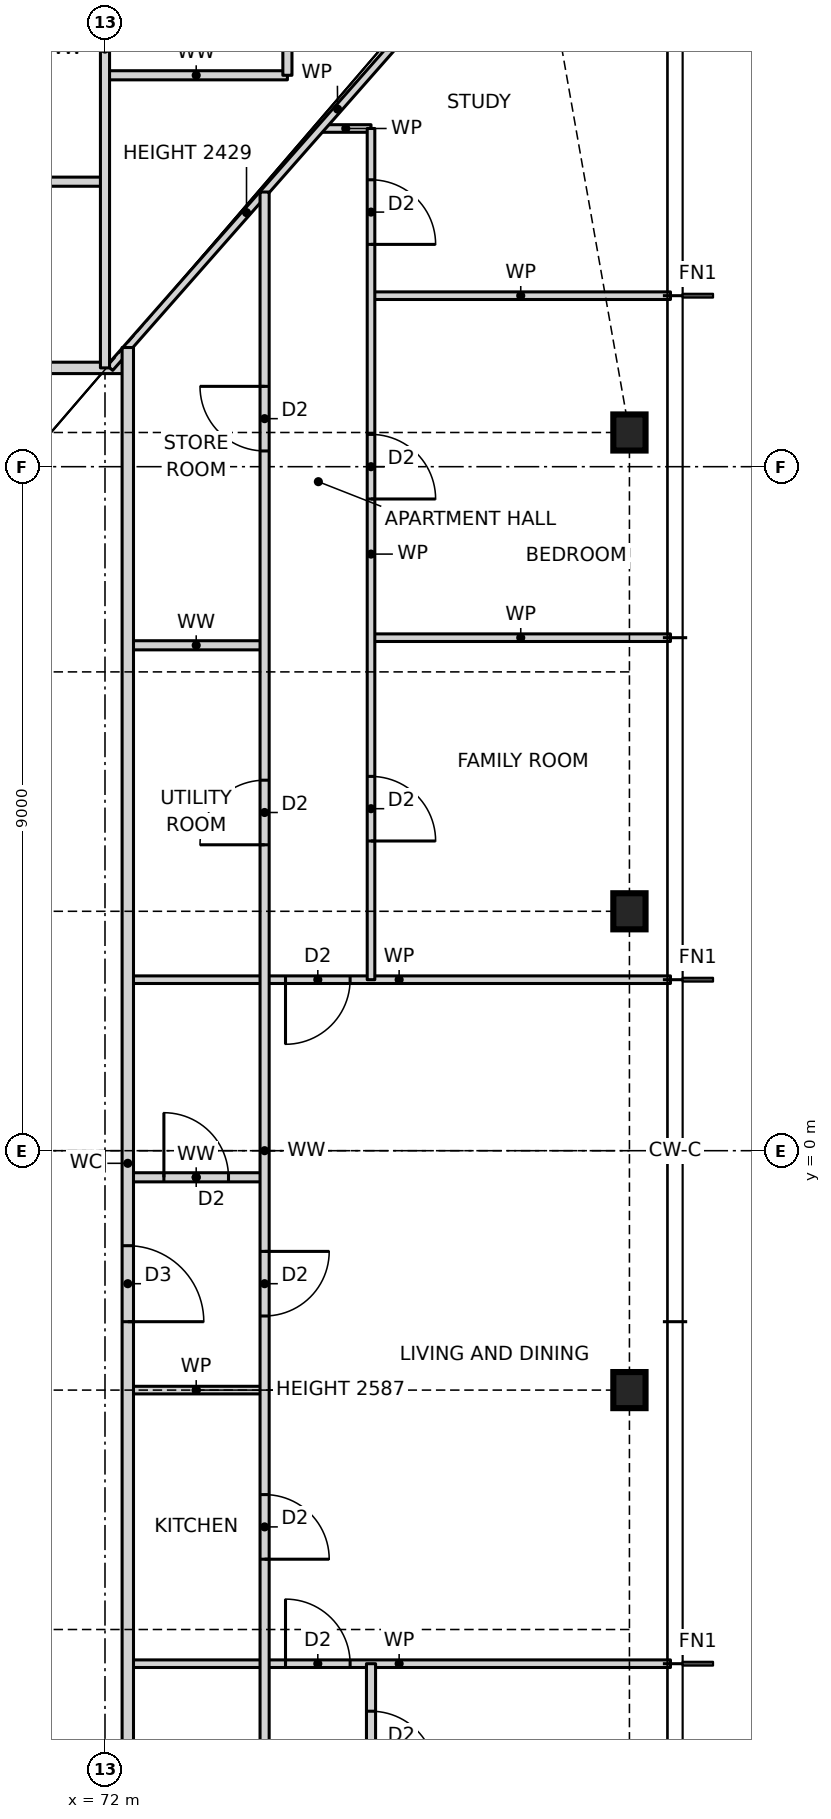
"""IFC4 building model, lengths in metres.
Left out: names, types, materials, properties, quantities, classifications, styles, units other than length and angle.
Written with IfcOpenShell. Run it as: python <this file> out.ifc"""

import sys

from ifc_helpers import new_model, si_unit, direction, frame, frame_2d, origin, origin_2d, place, context, subcontext, project, spatial, rectangle, i_section, extrude, element, fill, save


model = new_model("IFC4")
c1 = context("Model", 3, precision=1e-05, world=origin(), true_north=direction((0.0, 1.0)))
c2 = subcontext(c1, "Body", "Model", "MODEL_VIEW")
j1 = project(units=[si_unit("LENGTHUNIT", "METRE"), si_unit("PLANEANGLEUNIT", "RADIAN")], contexts=[c1])
p1 = place(None, origin())
s1 = spatial("IfcSite", under=j1, at=p1, CompositionType="ELEMENT")
p2 = place(p1, origin())
s2 = spatial("IfcBuilding", under=s1, at=p2, CompositionType="ELEMENT")
p3 = place(p2, frame((0.0, 0.0, 57.0)))
s3 = spatial("IfcBuildingStorey", under=s2, at=p3, CompositionType="ELEMENT", Elevation=57.0)
for number, where, z_axis, x_axis in (
    (1, (78.9, -3.15, 0.0), (0.0, 0.0, 1.0), (1.0, 0.0, 0.0)),
    (2, (78.9, 3.15, 0.0), (0.0, 0.0, 1.0), (1.0, 0.0, 0.0)),
    (3, (78.9, 9.45, 0.0), (0.0, 0.0, 1.0), (1.0, 0.0, 0.0)),
):
    element("IfcColumn", number, at=place(p3, frame(where, z_axis=z_axis, x_axis=x_axis)), inside=s3, PredefinedType="COLUMN", context=c2, shape_type="SweptSolid", body=[
        extrude(i_section(OverallWidth=0.424, OverallDepth=0.475, WebThickness=0.048, FlangeThickness=0.077, at=origin_2d()), origin(), (0.0, 0.0, 1.0), 3.5),
    ])
p4 = place(p3, frame((72.3, -6.75, 0.0), z_axis=(0.0, 0.0, 1.0), x_axis=(1.0, 0.0, 0.0)))
e4 = element("IfcWall", 4, at=p4, inside=s3, PredefinedType="PARTITIONING", context=c2, shape_type="SweptSolid", body=[
    extrude(rectangle(XDim=7.14, YDim=0.1, at=frame_2d((3.57, 0.0))), origin(), (0.0, 0.0, 1.0), 3.27),
])
p5 = place(p4, frame((2.075, 0.0, 0.0)))
e5 = element("IfcOpeningElement", 5, at=p5, cuts=e4, PredefinedType="OPENING", context=c2, shape_type="SweptSolid", body=[
    extrude(rectangle(XDim=0.85, YDim=2.1, at=frame_2d((0.425, 1.05))), frame((0.0, 0.06, 0.0), z_axis=(0.0, -1.0, 0.0), x_axis=(1.0, 0.0, 0.0)), (0.0, 0.0, 1.0), 0.12),
])
p6 = place(p3, frame((72.3, -3.15, 0.0), z_axis=(0.0, 0.0, 1.0), x_axis=(1.0, 0.0, 0.0)))
e6 = element("IfcWall", 6, at=p6, inside=s3, PredefinedType="PARTITIONING", context=c2, shape_type="SweptSolid", body=[
    extrude(rectangle(XDim=1.8, YDim=0.1, at=frame_2d((0.9, 0.0))), origin(), (0.0, 0.0, 1.0), 2.587),
])
p7 = place(p3, frame((72.3, -0.35, 0.0), z_axis=(0.0, 0.0, 1.0), x_axis=(1.0, 0.0, 0.0)))
e7 = element("IfcWall", 7, at=p7, inside=s3, PredefinedType="PARTITIONING", context=c2, shape_type="SweptSolid", body=[
    extrude(rectangle(XDim=1.8, YDim=0.12, at=frame_2d((0.9, 0.0))), origin(), (0.0, 0.0, 1.0), 3.27),
])
p8 = place(p7, frame((0.475, 0.0, 0.0)))
e8 = element("IfcOpeningElement", 8, at=p8, cuts=e7, PredefinedType="OPENING", context=c2, shape_type="SweptSolid", body=[
    extrude(rectangle(XDim=0.85, YDim=2.1, at=frame_2d((0.425, 1.05))), frame((0.0, 0.07, 0.0), z_axis=(0.0, -1.0, 0.0), x_axis=(1.0, 0.0, 0.0)), (0.0, 0.0, 1.0), 0.14),
])
p9 = place(p3, frame((72.3, 2.25, 0.0), z_axis=(0.0, 0.0, 1.0), x_axis=(1.0, 0.0, 0.0)))
e9 = element("IfcWall", 9, at=p9, inside=s3, PredefinedType="PARTITIONING", context=c2, shape_type="SweptSolid", body=[
    extrude(rectangle(XDim=7.14, YDim=0.1, at=frame_2d((3.57, 0.0))), origin(), (0.0, 0.0, 1.0), 3.27),
])
p10 = place(p9, frame((2.075, 0.0, 0.0)))
e10 = element("IfcOpeningElement", 10, at=p10, cuts=e9, PredefinedType="OPENING", context=c2, shape_type="SweptSolid", body=[
    extrude(rectangle(XDim=0.85, YDim=2.1, at=frame_2d((0.425, 1.05))), frame((0.0, 0.06, 0.0), z_axis=(0.0, -1.0, 0.0), x_axis=(1.0, 0.0, 0.0)), (0.0, 0.0, 1.0), 0.12),
])
p11 = place(p3, frame((72.3, 6.65, 0.0), z_axis=(0.0, 0.0, 1.0), x_axis=(1.0, 0.0, 0.0)))
e11 = element("IfcWall", 11, at=p11, inside=s3, PredefinedType="PARTITIONING", context=c2, shape_type="SweptSolid", body=[
    extrude(rectangle(XDim=1.8, YDim=0.12, at=frame_2d((0.9, 0.0))), origin(), (0.0, 0.0, 1.0), 3.27),
])
p12 = place(p3, frame((75.5, 6.75, 0.0), z_axis=(0.0, 0.0, 1.0), x_axis=(1.0, 0.0, 0.0)))
e12 = element("IfcWall", 12, at=p12, inside=s3, PredefinedType="PARTITIONING", context=c2, shape_type="SweptSolid", body=[
    extrude(rectangle(XDim=3.94, YDim=0.1, at=frame_2d((1.97, 0.0))), origin(), (0.0, 0.0, 1.0), 3.27),
])
p13 = place(p3, frame((53.7, 10.3, 0.0), z_axis=(0.0, 0.0, 1.0), x_axis=(1.0, 0.0, 0.0)))
e13 = element("IfcWall", 13, at=p13, inside=s3, PredefinedType="PARTITIONING", context=c2, shape_type="SweptSolid", body=[
    extrude(rectangle(XDim=18.6, YDim=0.15, at=frame_2d((9.3, 0.0))), origin(), (0.0, 0.0, 1.0), 3.27),
])
p14 = place(p13, frame((12.8, 0.0, 0.0)))
e14 = element("IfcOpeningElement", 14, at=p14, cuts=e13, PredefinedType="OPENING", context=c2, shape_type="SweptSolid", body=[
    extrude(rectangle(XDim=1.0, YDim=2.1, at=frame_2d((0.5, 1.05))), frame((0.0, 0.085, 0.0), z_axis=(0.0, -1.0, 0.0), x_axis=(1.0, 0.0, 0.0)), (0.0, 0.0, 1.0), 0.17),
])
p15 = place(p3, frame((75.5, 11.25, 0.0), z_axis=(0.0, 0.0, 1.0), x_axis=(1.0, 0.0, 0.0)))
e15 = element("IfcWall", 15, at=p15, inside=s3, PredefinedType="PARTITIONING", context=c2, shape_type="SweptSolid", body=[
    extrude(rectangle(XDim=3.94, YDim=0.1, at=frame_2d((1.97, 0.0))), origin(), (0.0, 0.0, 1.0), 3.27),
])
p16 = place(p3, frame((51.8, 12.75, 0.0), z_axis=(0.0, 0.0, 1.0), x_axis=(1.0, 0.0, 0.0)))
e16 = element("IfcWall", 16, at=p16, inside=s3, PredefinedType="PARTITIONING", context=c2, shape_type="SweptSolid", body=[
    extrude(rectangle(XDim=20.2, YDim=0.12, at=frame_2d((10.1, 0.0))), origin(), (0.0, 0.0, 1.0), 3.27),
])
p17 = place(p16, frame((17.975, 0.0, 0.0)))
e17 = element("IfcOpeningElement", 17, at=p17, cuts=e16, PredefinedType="OPENING", context=c2, shape_type="SweptSolid", body=[
    extrude(rectangle(XDim=0.85, YDim=2.1, at=frame_2d((0.425, 1.05))), frame((0.0, 0.07, 0.0), z_axis=(0.0, -1.0, 0.0), x_axis=(1.0, 0.0, 0.0)), (0.0, 0.0, 1.0), 0.14),
])
p18 = place(p16, frame((14.775, 0.0, 0.0)))
e18 = element("IfcOpeningElement", 18, at=p18, cuts=e16, PredefinedType="OPENING", context=c2, shape_type="SweptSolid", body=[
    extrude(rectangle(XDim=0.85, YDim=2.1, at=frame_2d((0.425, 1.05))), frame((0.0, 0.07, 0.0), z_axis=(0.0, -1.0, 0.0), x_axis=(1.0, 0.0, 0.0)), (0.0, 0.0, 1.0), 0.14),
])
p19 = place(p16, frame((9.125, 0.0, 0.0)))
e19 = element("IfcOpeningElement", 19, at=p19, cuts=e16, PredefinedType="OPENING", context=c2, shape_type="SweptSolid", body=[
    extrude(rectangle(XDim=0.85, YDim=2.1, at=frame_2d((0.425, 1.05))), frame((0.0, 0.07, 0.0), z_axis=(0.0, -1.0, 0.0), x_axis=(1.0, 0.0, 0.0)), (0.0, 0.0, 1.0), 0.14),
])
p20 = place(p16, frame((3.525, 0.0, 0.0)))
e20 = element("IfcOpeningElement", 20, at=p20, cuts=e16, PredefinedType="OPENING", context=c2, shape_type="SweptSolid", body=[
    extrude(rectangle(XDim=0.85, YDim=2.1, at=frame_2d((0.425, 1.05))), frame((0.0, 0.07, 0.0), z_axis=(0.0, -1.0, 0.0), x_axis=(1.0, 0.0, 0.0)), (0.0, 0.0, 1.0), 0.14),
])
p21 = place(p3, frame((74.836, 13.45, 0.0), z_axis=(0.0, 0.0, 1.0), x_axis=(1.0, 0.0, 0.0)))
e21 = element("IfcWall", 21, at=p21, inside=s3, PredefinedType="PARTITIONING", context=c2, shape_type="SweptSolid", body=[
    extrude(rectangle(XDim=0.664, YDim=0.1, at=frame_2d((0.332, 0.0))), origin(), (0.0, 0.0, 1.0), 3.27),
])
p22 = place(p3, frame((72.0, 14.15, 0.0), z_axis=(0.0, 0.0, 1.0), x_axis=(1.0, 0.0, 0.0)))
e22 = element("IfcWall", 22, at=p22, inside=s3, PredefinedType="PARTITIONING", context=c2, shape_type="SweptSolid", body=[
    extrude(rectangle(XDim=2.4, YDim=0.12, at=frame_2d((1.2, 0.0))), origin(), (0.0, 0.0, 1.0), 3.27),
])
p23 = place(p3, frame((72.064, 10.3, 0.0), z_axis=(0.0, 0.0, 1.0), x_axis=(0.660700699661, 0.750649442461, 0.0)))
e23 = element("IfcWall", 23, at=p23, inside=s3, PredefinedType="PARTITIONING", context=c2, shape_type="SweptSolid", body=[
    extrude(rectangle(XDim=9.071, YDim=0.1, at=frame_2d((4.535, 0.0))), origin(), (0.0, 0.0, 1.0), 2.429),
])
p24 = place(p3, frame((75.5, -13.45, 0.0), z_axis=(0.0, 0.0, 1.0), x_axis=(0.0, 1.0, 0.0)))
e24 = element("IfcWall", 24, at=p24, inside=s3, PredefinedType="PARTITIONING", context=c2, shape_type="SweptSolid", body=[
    extrude(rectangle(XDim=6.7, YDim=0.12, at=frame_2d((3.35, 0.0))), origin(), (0.0, 0.0, 1.0), 3.27),
])
p25 = place(p24, frame((5.225, 0.0, 0.0)))
e25 = element("IfcOpeningElement", 25, at=p25, cuts=e24, PredefinedType="OPENING", context=c2, shape_type="SweptSolid", body=[
    extrude(rectangle(XDim=0.85, YDim=2.1, at=frame_2d((0.425, 1.05))), frame((0.0, 0.07, 0.0), z_axis=(0.0, -1.0, 0.0), x_axis=(1.0, 0.0, 0.0)), (0.0, 0.0, 1.0), 0.14),
])
p26 = place(p24, frame((0.675, 0.0, 0.0)))
e26 = element("IfcOpeningElement", 26, at=p26, cuts=e24, PredefinedType="OPENING", context=c2, shape_type="SweptSolid", body=[
    extrude(rectangle(XDim=0.85, YDim=2.1, at=frame_2d((0.425, 1.05))), frame((0.0, 0.07, 0.0), z_axis=(0.0, -1.0, 0.0), x_axis=(1.0, 0.0, 0.0)), (0.0, 0.0, 1.0), 0.14),
])
p27 = place(p3, frame((75.5, 2.25, 0.0), z_axis=(0.0, 0.0, 1.0), x_axis=(0.0, 1.0, 0.0)))
e27 = element("IfcWall", 27, at=p27, inside=s3, PredefinedType="PARTITIONING", context=c2, shape_type="SweptSolid", body=[
    extrude(rectangle(XDim=11.2, YDim=0.1, at=frame_2d((5.6, 0.0))), origin(), (0.0, 0.0, 1.0), 3.27),
])
p28 = place(p27, frame((1.825, 0.0, 0.0)))
e28 = element("IfcOpeningElement", 28, at=p28, cuts=e27, PredefinedType="OPENING", context=c2, shape_type="SweptSolid", body=[
    extrude(rectangle(XDim=0.85, YDim=2.1, at=frame_2d((0.425, 1.05))), frame((0.0, 0.06, 0.0), z_axis=(0.0, -1.0, 0.0), x_axis=(1.0, 0.0, 0.0)), (0.0, 0.0, 1.0), 0.12),
])
p29 = place(p27, frame((6.325, 0.0, 0.0)))
e29 = element("IfcOpeningElement", 29, at=p29, cuts=e27, PredefinedType="OPENING", context=c2, shape_type="SweptSolid", body=[
    extrude(rectangle(XDim=0.85, YDim=2.1, at=frame_2d((0.425, 1.05))), frame((0.0, 0.06, 0.0), z_axis=(0.0, -1.0, 0.0), x_axis=(1.0, 0.0, 0.0)), (0.0, 0.0, 1.0), 0.12),
])
p30 = place(p27, frame((9.675, 0.0, 0.0)))
e30 = element("IfcOpeningElement", 30, at=p30, cuts=e27, PredefinedType="OPENING", context=c2, shape_type="SweptSolid", body=[
    extrude(rectangle(XDim=0.85, YDim=2.1, at=frame_2d((0.425, 1.05))), frame((0.0, 0.06, 0.0), z_axis=(0.0, -1.0, 0.0), x_axis=(1.0, 0.0, 0.0)), (0.0, 0.0, 1.0), 0.12),
])
p31 = place(p3, frame((74.4, 14.15, 0.0), z_axis=(0.0, 0.0, 1.0), x_axis=(0.0, 1.0, 0.0)))
e31 = element("IfcWall", 31, at=p31, inside=s3, PredefinedType="PARTITIONING", context=c2, shape_type="SweptSolid", body=[
    extrude(rectangle(XDim=2.6, YDim=0.12, at=frame_2d((1.3, 0.0))), origin(), (0.0, 0.0, 1.0), 3.27),
])
p32 = place(p31, frame((0.875, 0.0, 0.0)))
e32 = element("IfcOpeningElement", 32, at=p32, cuts=e31, PredefinedType="OPENING", context=c2, shape_type="SweptSolid", body=[
    extrude(rectangle(XDim=0.85, YDim=2.1, at=frame_2d((0.425, 1.05))), frame((0.0, 0.07, 0.0), z_axis=(0.0, -1.0, 0.0), x_axis=(1.0, 0.0, 0.0)), (0.0, 0.0, 1.0), 0.14),
])
p33 = place(p3, frame((74.1, -12.614, 0.0), z_axis=(0.0, 0.0, 1.0), x_axis=(0.0, 1.0, 0.0)))
e33 = element("IfcWall", 33, at=p33, inside=s3, PredefinedType="PARTITIONING", context=c2, shape_type="SweptSolid", body=[
    extrude(rectangle(XDim=25.228, YDim=0.12, at=frame_2d((12.614, 0.0))), origin(), (0.0, 0.0, 1.0), 3.27),
])
p34 = place(p33, frame((7.239, 0.0, 0.0)))
e34 = element("IfcOpeningElement", 34, at=p34, cuts=e33, PredefinedType="OPENING", context=c2, shape_type="SweptSolid", body=[
    extrude(rectangle(XDim=0.85, YDim=2.1, at=frame_2d((0.425, 1.05))), frame((0.0, 0.07, 0.0), z_axis=(0.0, -1.0, 0.0), x_axis=(1.0, 0.0, 0.0)), (0.0, 0.0, 1.0), 0.14),
])
p35 = place(p33, frame((10.439, 0.0, 0.0)))
e35 = element("IfcOpeningElement", 35, at=p35, cuts=e33, PredefinedType="OPENING", context=c2, shape_type="SweptSolid", body=[
    extrude(rectangle(XDim=0.85, YDim=2.1, at=frame_2d((0.425, 1.05))), frame((0.0, 0.07, 0.0), z_axis=(0.0, -1.0, 0.0), x_axis=(1.0, 0.0, 0.0)), (0.0, 0.0, 1.0), 0.14),
])
p36 = place(p33, frame((2.507, 0.0, 0.0)))
e36 = element("IfcOpeningElement", 36, at=p36, cuts=e33, PredefinedType="OPENING", context=c2, shape_type="SweptSolid", body=[
    extrude(rectangle(XDim=0.85, YDim=2.1, at=frame_2d((0.425, 1.05))), frame((0.0, 0.07, 0.0), z_axis=(0.0, -1.0, 0.0), x_axis=(1.0, 0.0, 0.0)), (0.0, 0.0, 1.0), 0.14),
])
p37 = place(p33, frame((16.639, 0.0, 0.0)))
e37 = element("IfcOpeningElement", 37, at=p37, cuts=e33, PredefinedType="OPENING", context=c2, shape_type="SweptSolid", body=[
    extrude(rectangle(XDim=0.85, YDim=2.1, at=frame_2d((0.425, 1.05))), frame((0.0, 0.07, 0.0), z_axis=(0.0, -1.0, 0.0), x_axis=(1.0, 0.0, 0.0)), (0.0, 0.0, 1.0), 0.14),
])
p38 = place(p33, frame((21.821, 0.0, 0.0)))
e38 = element("IfcOpeningElement", 38, at=p38, cuts=e33, PredefinedType="OPENING", context=c2, shape_type="SweptSolid", body=[
    extrude(rectangle(XDim=0.85, YDim=2.1, at=frame_2d((0.425, 1.05))), frame((0.0, 0.07, 0.0), z_axis=(0.0, -1.0, 0.0), x_axis=(1.0, 0.0, 0.0)), (0.0, 0.0, 1.0), 0.14),
])
p39 = place(p3, frame((72.3, -10.9, 0.0), z_axis=(0.0, 0.0, 1.0), x_axis=(0.0, 1.0, 0.0)))
e39 = element("IfcWall", 39, at=p39, inside=s3, PredefinedType="PARTITIONING", context=c2, shape_type="SweptSolid", body=[
    extrude(rectangle(XDim=21.468, YDim=0.15, at=frame_2d((10.734, 0.0))), origin(), (0.0, 0.0, 1.0), 3.27),
])
p40 = place(p39, frame((8.65, 0.0, 0.0)))
e40 = element("IfcOpeningElement", 40, at=p40, cuts=e39, PredefinedType="OPENING", context=c2, shape_type="SweptSolid", body=[
    extrude(rectangle(XDim=1.0, YDim=2.1, at=frame_2d((0.5, 1.05))), frame((0.0, 0.085, 0.0), z_axis=(0.0, -1.0, 0.0), x_axis=(1.0, 0.0, 0.0)), (0.0, 0.0, 1.0), 0.17),
])
p41 = place(p3, frame((72.0, 10.3, 0.0), z_axis=(0.0, 0.0, 1.0), x_axis=(0.0, 1.0, 0.0)))
e41 = element("IfcWall", 41, at=p41, inside=s3, PredefinedType="PARTITIONING", context=c2, shape_type="SweptSolid", body=[
    extrude(rectangle(XDim=8.39, YDim=0.12, at=frame_2d((4.195, 0.0))), origin(), (0.0, 0.0, 1.0), 3.27),
])
p42 = place(p41, frame((6.55, 0.0, 0.0)))
e42 = element("IfcOpeningElement", 42, at=p42, cuts=e41, PredefinedType="OPENING", context=c2, shape_type="SweptSolid", body=[
    extrude(rectangle(XDim=0.85, YDim=2.1, at=frame_2d((0.425, 1.05))), frame((0.0, 0.07, 0.0), z_axis=(0.0, -1.0, 0.0), x_axis=(1.0, 0.0, 0.0)), (0.0, 0.0, 1.0), 0.14),
])
p43 = place(p34, frame((0.85, 0.0, 0.0), z_axis=(0.0, 0.0, 1.0), x_axis=(-1.0, 0.0, 0.0)))
e43 = element("IfcDoor", 43, at=p43, inside=s3, OperationType="SINGLE_SWING_RIGHT", PredefinedType="DOOR", context=c2, shape_type="SweptSolid", body=[
    extrude(rectangle(XDim=0.85, YDim=2.1, at=frame_2d((0.425, 1.05))), frame((0.0, 0.025, 0.0), z_axis=(0.0, -1.0, 0.0), x_axis=(1.0, 0.0, 0.0)), (0.0, 0.0, 1.0), 0.05),
])
fill(e34, e43)
p44 = place(p40, frame((1.0, 0.0, 0.0), z_axis=(0.0, 0.0, 1.0), x_axis=(-1.0, 0.0, 0.0)))
e44 = element("IfcDoor", 44, at=p44, inside=s3, OperationType="SINGLE_SWING_RIGHT", PredefinedType="DOOR", context=c2, shape_type="SweptSolid", body=[
    extrude(rectangle(XDim=1.0, YDim=2.1, at=frame_2d((0.5, 1.05))), frame((0.0, 0.025, 0.0), z_axis=(0.0, -1.0, 0.0), x_axis=(1.0, 0.0, 0.0)), (0.0, 0.0, 1.0), 0.05),
])
fill(e40, e44)
p45 = place(p35, frame((0.85, 0.0, 0.0), z_axis=(0.0, 0.0, 1.0), x_axis=(-1.0, 0.0, 0.0)))
e45 = element("IfcDoor", 45, at=p45, inside=s3, OperationType="SINGLE_SWING_LEFT", PredefinedType="DOOR", context=c2, shape_type="SweptSolid", body=[
    extrude(rectangle(XDim=0.85, YDim=2.1, at=frame_2d((0.425, 1.05))), frame((0.0, 0.025, 0.0), z_axis=(0.0, -1.0, 0.0), x_axis=(1.0, 0.0, 0.0)), (0.0, 0.0, 1.0), 0.05),
])
fill(e35, e45)
p46 = place(p8, origin())
e46 = element("IfcDoor", 46, at=p46, inside=s3, OperationType="SINGLE_SWING_LEFT", PredefinedType="DOOR", context=c2, shape_type="SweptSolid", body=[
    extrude(rectangle(XDim=0.85, YDim=2.1, at=frame_2d((0.425, 1.05))), frame((0.0, 0.025, 0.0), z_axis=(0.0, -1.0, 0.0), x_axis=(1.0, 0.0, 0.0)), (0.0, 0.0, 1.0), 0.05),
])
fill(e8, e46)
p47 = place(p5, origin())
e47 = element("IfcDoor", 47, at=p47, inside=s3, OperationType="SINGLE_SWING_LEFT", PredefinedType="DOOR", context=c2, shape_type="SweptSolid", body=[
    extrude(rectangle(XDim=0.85, YDim=2.1, at=frame_2d((0.425, 1.05))), frame((0.0, 0.025, 0.0), z_axis=(0.0, -1.0, 0.0), x_axis=(1.0, 0.0, 0.0)), (0.0, 0.0, 1.0), 0.05),
])
fill(e5, e47)
p48 = place(p25, frame((0.85, 0.0, 0.0), z_axis=(0.0, 0.0, 1.0), x_axis=(-1.0, 0.0, 0.0)))
e48 = element("IfcDoor", 48, at=p48, inside=s3, OperationType="SINGLE_SWING_RIGHT", PredefinedType="DOOR", context=c2, shape_type="SweptSolid", body=[
    extrude(rectangle(XDim=0.85, YDim=2.1, at=frame_2d((0.425, 1.05))), frame((0.0, 0.025, 0.0), z_axis=(0.0, -1.0, 0.0), x_axis=(1.0, 0.0, 0.0)), (0.0, 0.0, 1.0), 0.05),
])
fill(e25, e48)
p49 = place(p10, frame((0.85, 0.0, 0.0), z_axis=(0.0, 0.0, 1.0), x_axis=(-1.0, 0.0, 0.0)))
e49 = element("IfcDoor", 49, at=p49, inside=s3, OperationType="SINGLE_SWING_RIGHT", PredefinedType="DOOR", context=c2, shape_type="SweptSolid", body=[
    extrude(rectangle(XDim=0.85, YDim=2.1, at=frame_2d((0.425, 1.05))), frame((0.0, 0.025, 0.0), z_axis=(0.0, -1.0, 0.0), x_axis=(1.0, 0.0, 0.0)), (0.0, 0.0, 1.0), 0.05),
])
fill(e10, e49)
p50 = place(p28, frame((0.85, 0.0, 0.0), z_axis=(0.0, 0.0, 1.0), x_axis=(-1.0, 0.0, 0.0)))
e50 = element("IfcDoor", 50, at=p50, inside=s3, OperationType="SINGLE_SWING_RIGHT", PredefinedType="DOOR", context=c2, shape_type="SweptSolid", body=[
    extrude(rectangle(XDim=0.85, YDim=2.1, at=frame_2d((0.425, 1.05))), frame((0.0, 0.025, 0.0), z_axis=(0.0, -1.0, 0.0), x_axis=(1.0, 0.0, 0.0)), (0.0, 0.0, 1.0), 0.05),
])
fill(e28, e50)
p51 = place(p29, frame((0.85, 0.0, 0.0), z_axis=(0.0, 0.0, 1.0), x_axis=(-1.0, 0.0, 0.0)))
e51 = element("IfcDoor", 51, at=p51, inside=s3, OperationType="SINGLE_SWING_RIGHT", PredefinedType="DOOR", context=c2, shape_type="SweptSolid", body=[
    extrude(rectangle(XDim=0.85, YDim=2.1, at=frame_2d((0.425, 1.05))), frame((0.0, 0.025, 0.0), z_axis=(0.0, -1.0, 0.0), x_axis=(1.0, 0.0, 0.0)), (0.0, 0.0, 1.0), 0.05),
])
fill(e29, e51)
p52 = place(p30, frame((0.85, 0.0, 0.0), z_axis=(0.0, 0.0, 1.0), x_axis=(-1.0, 0.0, 0.0)))
e52 = element("IfcDoor", 52, at=p52, inside=s3, OperationType="SINGLE_SWING_RIGHT", PredefinedType="DOOR", context=c2, shape_type="SweptSolid", body=[
    extrude(rectangle(XDim=0.85, YDim=2.1, at=frame_2d((0.425, 1.05))), frame((0.0, 0.025, 0.0), z_axis=(0.0, -1.0, 0.0), x_axis=(1.0, 0.0, 0.0)), (0.0, 0.0, 1.0), 0.05),
])
fill(e30, e52)
p53 = place(p37, origin())
e53 = element("IfcDoor", 53, at=p53, inside=s3, OperationType="SINGLE_SWING_LEFT", PredefinedType="DOOR", context=c2, shape_type="SweptSolid", body=[
    extrude(rectangle(XDim=0.85, YDim=2.1, at=frame_2d((0.425, 1.05))), frame((0.0, 0.025, 0.0), z_axis=(0.0, -1.0, 0.0), x_axis=(1.0, 0.0, 0.0)), (0.0, 0.0, 1.0), 0.05),
])
fill(e37, e53)
p54 = place(p38, origin())
e54 = element("IfcDoor", 54, at=p54, inside=s3, OperationType="SINGLE_SWING_RIGHT", PredefinedType="DOOR", context=c2, shape_type="SweptSolid", body=[
    extrude(rectangle(XDim=0.85, YDim=2.1, at=frame_2d((0.425, 1.05))), frame((0.0, 0.025, 0.0), z_axis=(0.0, -1.0, 0.0), x_axis=(1.0, 0.0, 0.0)), (0.0, 0.0, 1.0), 0.05),
])
fill(e38, e54)
save(model, sys.argv[1])
